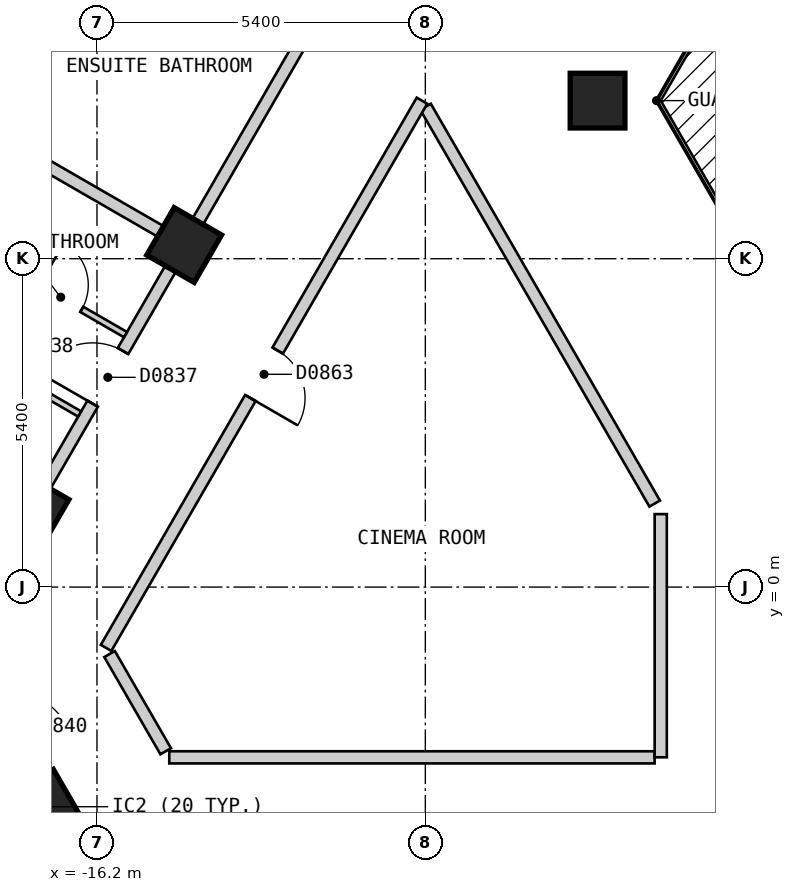
"""IFC4 building model, lengths in metres.
Left out: names, types, materials, properties, quantities, classifications, styles, units other than length and angle.
Written with IfcOpenShell. Run it as: python <this file> out.ifc"""

import sys

from ifc_helpers import new_model, si_unit, direction, frame, frame_2d, origin, origin_2d, place, context, subcontext, project, spatial, polyline, rectangle, outline, extrude, element, fill, save


model = new_model("IFC4")
c1 = context("Model", 3, precision=1e-05, world=origin(), true_north=direction((0.0, 1.0)))
c2 = subcontext(c1, "Body", "Model", "MODEL_VIEW")
j1 = project(units=[si_unit("LENGTHUNIT", "METRE"), si_unit("PLANEANGLEUNIT", "RADIAN")], contexts=[c1])
p1 = place(None, origin())
s1 = spatial("IfcSite", under=j1, at=p1, CompositionType="ELEMENT")
p2 = place(p1, origin())
s2 = spatial("IfcBuilding", under=s1, at=p2, CompositionType="ELEMENT")
p3 = place(p2, frame((0.0, 0.0, 72.0)))
s3 = spatial("IfcBuildingStorey", under=s2, at=p3, CompositionType="ELEMENT", Elevation=72.0)
for number, where, z_axis, x_axis in (
    (1, (-17.083, -3.612, 0.0), (0.0, 0.0, 1.0), (0.5, -0.866, 0.0)),
    (2, (-7.967, 8.0, 0.0), (0.0, 0.0, 1.0), (1.0, 0.0, 0.0)),
    (3, (-14.766, 5.625, 0.0), (0.0, 0.0, 1.0), (-0.5, -0.866, 0.0)),
    (4, (-17.277, 1.275, 0.0), (0.0, 0.0, 1.0), (-0.5, -0.866, 0.0)),
):
    element("IfcColumn", number, at=place(p3, frame(where, z_axis=z_axis, x_axis=x_axis)), inside=s3, PredefinedType="COLUMN", context=c2, shape_type="SweptSolid", body=[
        extrude(rectangle(XDim=0.9, YDim=0.9, at=origin_2d()), origin(), (0.0, 0.0, 1.0), 3.0),
    ])
p4 = place(p3, frame((-15.747, 24.425, 0.0), z_axis=(0.0, 0.0, 1.0), x_axis=(-0.500027479704, -0.866009537788, 0.0)))
e5 = element("IfcWall", 5, at=p4, inside=s3, PredefinedType="SOLIDWALL", context=c2, shape_type="SweptSolid", body=[
    extrude(outline(polyline([(0.0, -0.15), (26.559, -0.15), (26.478, 0.15), (0.08, 0.15), (0.0, -0.15)])), origin(), (0.0, 0.0, 1.0), 2.7),
])
p5 = place(p4, frame((2.483, 0.0, 0.15)))
e6 = element("IfcOpeningElement", 6, at=p5, cuts=e5, PredefinedType="OPENING", context=c2, shape_type="SweptSolid", body=[
    extrude(rectangle(XDim=1.5, YDim=2.1, at=frame_2d((0.75, 1.05))), frame((0.0, 0.16, 0.0), z_axis=(0.0, -1.0, 0.0), x_axis=(1.0, 0.0, 0.0)), (0.0, 0.0, 1.0), 0.32),
])
p6 = place(p4, frame((7.506, 0.0, 0.15)))
e7 = element("IfcOpeningElement", 7, at=p6, cuts=e5, PredefinedType="OPENING", context=c2, shape_type="SweptSolid", body=[
    extrude(rectangle(XDim=1.5, YDim=2.1, at=frame_2d((0.75, 1.05))), frame((0.0, 0.16, 0.0), z_axis=(0.0, -1.0, 0.0), x_axis=(1.0, 0.0, 0.0)), (0.0, 0.0, 1.0), 0.32),
])
p7 = place(p4, frame((12.529, 0.0, 0.15)))
e8 = element("IfcOpeningElement", 8, at=p7, cuts=e5, PredefinedType="OPENING", context=c2, shape_type="SweptSolid", body=[
    extrude(rectangle(XDim=1.5, YDim=2.1, at=frame_2d((0.75, 1.05))), frame((0.0, 0.16, 0.0), z_axis=(0.0, -1.0, 0.0), x_axis=(1.0, 0.0, 0.0)), (0.0, 0.0, 1.0), 0.32),
])
p8 = place(p4, frame((17.552, 0.0, 0.15)))
e9 = element("IfcOpeningElement", 9, at=p8, cuts=e5, PredefinedType="OPENING", context=c2, shape_type="SweptSolid", body=[
    extrude(rectangle(XDim=1.5, YDim=2.1, at=frame_2d((0.75, 1.05))), frame((0.0, 0.16, 0.0), z_axis=(0.0, -1.0, 0.0), x_axis=(1.0, 0.0, 0.0)), (0.0, 0.0, 1.0), 0.32),
])
p9 = place(p4, frame((22.575, 0.0, 0.15)))
e10 = element("IfcOpeningElement", 10, at=p9, cuts=e5, PredefinedType="OPENING", context=c2, shape_type="SweptSolid", body=[
    extrude(rectangle(XDim=1.5, YDim=2.1, at=frame_2d((0.75, 1.05))), frame((0.0, 0.16, 0.0), z_axis=(0.0, -1.0, 0.0), x_axis=(1.0, 0.0, 0.0)), (0.0, 0.0, 1.0), 0.32),
])
p10 = place(p3, frame((-10.796, 7.899, 0.0), z_axis=(0.0, 0.0, 1.0), x_axis=(0.500010383074, -0.866019409031, 0.0)))
e11 = element("IfcWall", 11, at=p10, inside=s3, PredefinedType="PARTITIONING", context=c2, shape_type="SweptSolid", body=[
    extrude(rectangle(XDim=7.535, YDim=0.2, at=frame_2d((3.768, 0.0))), origin(), (0.0, 0.0, 1.0), 2.7),
])
p11 = place(p3, frame((-15.993, -1.101, 0.0), z_axis=(0.0, 0.0, 1.0), x_axis=(0.499894174133, -0.866086493757, 0.0)))
e12 = element("IfcWall", 12, at=p11, inside=s3, PredefinedType="PARTITIONING", context=c2, shape_type="SweptSolid", body=[
    extrude(rectangle(XDim=1.846, YDim=0.2, at=frame_2d((0.923, 0.0))), origin(), (0.0, 0.0, 1.0), 2.7),
])
p12 = place(p3, frame((-18.533, -1.101, 0.0), z_axis=(0.0, 0.0, 1.0), x_axis=(0.500022085096, -0.866012652573, 0.0)))
e13 = element("IfcWall", 13, at=p12, inside=s3, PredefinedType="PARTITIONING", context=c2, shape_type="SweptSolid", body=[
    extrude(rectangle(XDim=6.066, YDim=0.2, at=frame_2d((3.033, 0.0))), origin(), (0.0, 0.0, 1.0), 2.7),
])
p13 = place(p12, frame((0.892, 0.0, 0.0)))
e14 = element("IfcOpeningElement", 14, at=p13, cuts=e13, PredefinedType="OPENING", context=c2, shape_type="SweptSolid", body=[
    extrude(rectangle(XDim=1.0, YDim=2.1, at=frame_2d((0.5, 1.05))), frame((0.0, 0.11, 0.0), z_axis=(0.0, -1.0, 0.0), x_axis=(1.0, 0.0, 0.0)), (0.0, 0.0, 1.0), 0.22),
])
p14 = place(p3, frame((-15.011, -2.8, 0.0), z_axis=(0.0, 0.0, 1.0), x_axis=(1.0, 0.0, 0.0)))
e15 = element("IfcWall", 15, at=p14, inside=s3, PredefinedType="PARTITIONING", context=c2, shape_type="SweptSolid", body=[
    extrude(rectangle(XDim=7.982, YDim=0.2, at=frame_2d((3.991, 0.0))), origin(), (0.0, 0.0, 1.0), 2.7),
])
p15 = place(p3, frame((-16.05, -1.0, 0.0), z_axis=(0.0, 0.0, 1.0), x_axis=(0.499962449088, 0.866047082728, 0.0)))
e16 = element("IfcWall", 16, at=p15, inside=s3, PredefinedType="PARTITIONING", context=c2, shape_type="SweptSolid", body=[
    extrude(rectangle(XDim=10.391, YDim=0.2, at=frame_2d((5.195, 0.0))), origin(), (0.0, 0.0, 1.0), 2.7),
])
p16 = place(p15, frame((4.745, 0.0, 0.0)))
e17 = element("IfcOpeningElement", 17, at=p16, cuts=e16, PredefinedType="OPENING", context=c2, shape_type="SweptSolid", body=[
    extrude(rectangle(XDim=0.9, YDim=2.1, at=frame_2d((0.45, 1.05))), frame((0.0, 0.11, 0.0), z_axis=(0.0, -1.0, 0.0), x_axis=(1.0, 0.0, 0.0)), (0.0, 0.0, 1.0), 0.22),
])
p17 = place(p3, frame((-18.562, -0.951, 0.0), z_axis=(0.0, 0.0, 1.0), x_axis=(0.499992962407, 0.866029466902, 0.0)))
e18 = element("IfcWall", 18, at=p17, inside=s3, PredefinedType="PARTITIONING", context=c2, shape_type="SweptSolid", body=[
    extrude(rectangle(XDim=20.208, YDim=0.2, at=frame_2d((10.104, 0.0))), origin(), (0.0, 0.0, 1.0), 2.7),
])
p18 = place(p17, frame((14.627, 0.0, 0.0)))
e19 = element("IfcOpeningElement", 19, at=p18, cuts=e18, PredefinedType="OPENING", context=c2, shape_type="SweptSolid", body=[
    extrude(rectangle(XDim=1.0, YDim=2.1, at=frame_2d((0.5, 1.05))), frame((0.0, 0.11, 0.0), z_axis=(0.0, -1.0, 0.0), x_axis=(1.0, 0.0, 0.0)), (0.0, 0.0, 1.0), 0.22),
])
p19 = place(p17, frame((4.581, 0.0, 0.0)))
e20 = element("IfcOpeningElement", 20, at=p19, cuts=e18, PredefinedType="OPENING", context=c2, shape_type="SweptSolid", body=[
    extrude(rectangle(XDim=1.0, YDim=2.1, at=frame_2d((0.5, 1.05))), frame((0.0, 0.11, 0.0), z_axis=(0.0, -1.0, 0.0), x_axis=(1.0, 0.0, 0.0)), (0.0, 0.0, 1.0), 0.22),
])
p20 = place(p3, frame((-6.928, -2.799, 0.0), z_axis=(0.0, 0.0, 1.0), x_axis=(0.0, 1.0, 0.0)))
e21 = element("IfcWall", 21, at=p20, inside=s3, PredefinedType="PARTITIONING", context=c2, shape_type="SweptSolid", body=[
    extrude(rectangle(XDim=3.999, YDim=0.2, at=frame_2d((2.0, 0.0))), origin(), (0.0, 0.0, 1.0), 2.7),
])
p21 = place(p3, frame((-17.905, 5.407, 0.0), z_axis=(0.0, 0.0, 1.0), x_axis=(0.866080321209, -0.499904868165, 0.0)))
e22 = element("IfcWall", 22, at=p21, inside=s3, PredefinedType="PARTITIONING", context=c2, shape_type="SweptSolid", body=[
    extrude(rectangle(XDim=2.51, YDim=0.1, at=frame_2d((1.255, 0.0))), origin(), (0.0, 0.0, 1.0), 2.7),
])
p22 = place(p21, frame((0.88, 0.0, 0.0)))
e23 = element("IfcOpeningElement", 23, at=p22, cuts=e22, PredefinedType="OPENING", context=c2, shape_type="SweptSolid", body=[
    extrude(rectangle(XDim=0.8, YDim=2.1, at=frame_2d((0.4, 1.05))), frame((0.0, 0.06, 0.0), z_axis=(0.0, -1.0, 0.0), x_axis=(1.0, 0.0, 0.0)), (0.0, 0.0, 1.0), 0.12),
])
p23 = place(p3, frame((-18.658, 4.102, 0.0), z_axis=(0.0, 0.0, 1.0), x_axis=(0.865916579361, -0.500188442078, 0.0)))
e24 = element("IfcWall", 24, at=p23, inside=s3, PredefinedType="PARTITIONING", context=c2, shape_type="SweptSolid", body=[
    extrude(rectangle(XDim=2.509, YDim=0.1, at=frame_2d((1.255, 0.0))), origin(), (0.0, 0.0, 1.0), 2.7),
])
p24 = place(p23, frame((0.829, 0.0, 0.0)))
e25 = element("IfcOpeningElement", 25, at=p24, cuts=e24, PredefinedType="OPENING", context=c2, shape_type="SweptSolid", body=[
    extrude(rectangle(XDim=0.9, YDim=2.1, at=frame_2d((0.45, 1.05))), frame((0.0, 0.06, 0.0), z_axis=(0.0, -1.0, 0.0), x_axis=(1.0, 0.0, 0.0)), (0.0, 0.0, 1.0), 0.12),
])
p25 = place(p3, frame((-17.834, 7.512, 0.0), z_axis=(0.0, 0.0, 1.0), x_axis=(0.500093956194, 0.865971151354, 0.0)))
e26 = element("IfcWall", 26, at=p25, inside=s3, PredefinedType="PARTITIONING", context=c2, shape_type="SweptSolid", body=[
    extrude(rectangle(XDim=4.873, YDim=0.1, at=frame_2d((2.437, 0.0))), origin(), (0.0, 0.0, 1.0), 2.7),
])
p26 = place(p25, frame((2.012, 0.0, 0.0)))
e27 = element("IfcOpeningElement", 27, at=p26, cuts=e26, PredefinedType="OPENING", context=c2, shape_type="SweptSolid", body=[
    extrude(rectangle(XDim=0.8, YDim=2.1, at=frame_2d((0.4, 1.05))), frame((0.0, 0.06, 0.0), z_axis=(0.0, -1.0, 0.0), x_axis=(1.0, 0.0, 0.0)), (0.0, 0.0, 1.0), 0.12),
])
p27 = place(p3, frame((-23.513, 10.675, 0.0), z_axis=(0.0, 0.0, 1.0), x_axis=(0.866041268327, -0.499972520799, 0.0)))
e28 = element("IfcWall", 28, at=p27, inside=s3, PredefinedType="PARTITIONING", context=c2, shape_type="SweptSolid", body=[
    extrude(rectangle(XDim=10.0, YDim=0.2, at=frame_2d((5.0, 0.0))), origin(), (0.0, 0.0, 1.0), 2.7),
])
p28 = place(p19, origin())
e29 = element("IfcDoor", 29, at=p28, inside=s3, OperationType="SINGLE_SWING_LEFT", PredefinedType="DOOR", context=c2, shape_type="SweptSolid", body=[
    extrude(rectangle(XDim=1.0, YDim=2.1, at=frame_2d((0.5, 1.05))), frame((0.0, 0.025, 0.0), z_axis=(0.0, -1.0, 0.0), x_axis=(1.0, 0.0, 0.0)), (0.0, 0.0, 1.0), 0.05),
])
fill(e20, e29)
p29 = place(p22, origin())
e30 = element("IfcDoor", 30, at=p29, inside=s3, OperationType="SINGLE_SWING_LEFT", PredefinedType="DOOR", context=c2, shape_type="SweptSolid", body=[
    extrude(rectangle(XDim=0.8, YDim=2.1, at=frame_2d((0.4, 1.05))), frame((0.0, 0.025, 0.0), z_axis=(0.0, -1.0, 0.0), x_axis=(1.0, 0.0, 0.0)), (0.0, 0.0, 1.0), 0.05),
])
fill(e23, e30)
p30 = place(p16, origin())
e31 = element("IfcDoor", 31, at=p30, inside=s3, OperationType="SINGLE_SWING_LEFT", PredefinedType="DOOR", context=c2, shape_type="SweptSolid", body=[
    extrude(rectangle(XDim=0.9, YDim=2.1, at=frame_2d((0.45, 1.05))), frame((0.0, 0.025, 0.0), z_axis=(0.0, -1.0, 0.0), x_axis=(1.0, 0.0, 0.0)), (0.0, 0.0, 1.0), 0.05),
])
fill(e17, e31)
save(model, sys.argv[1])
